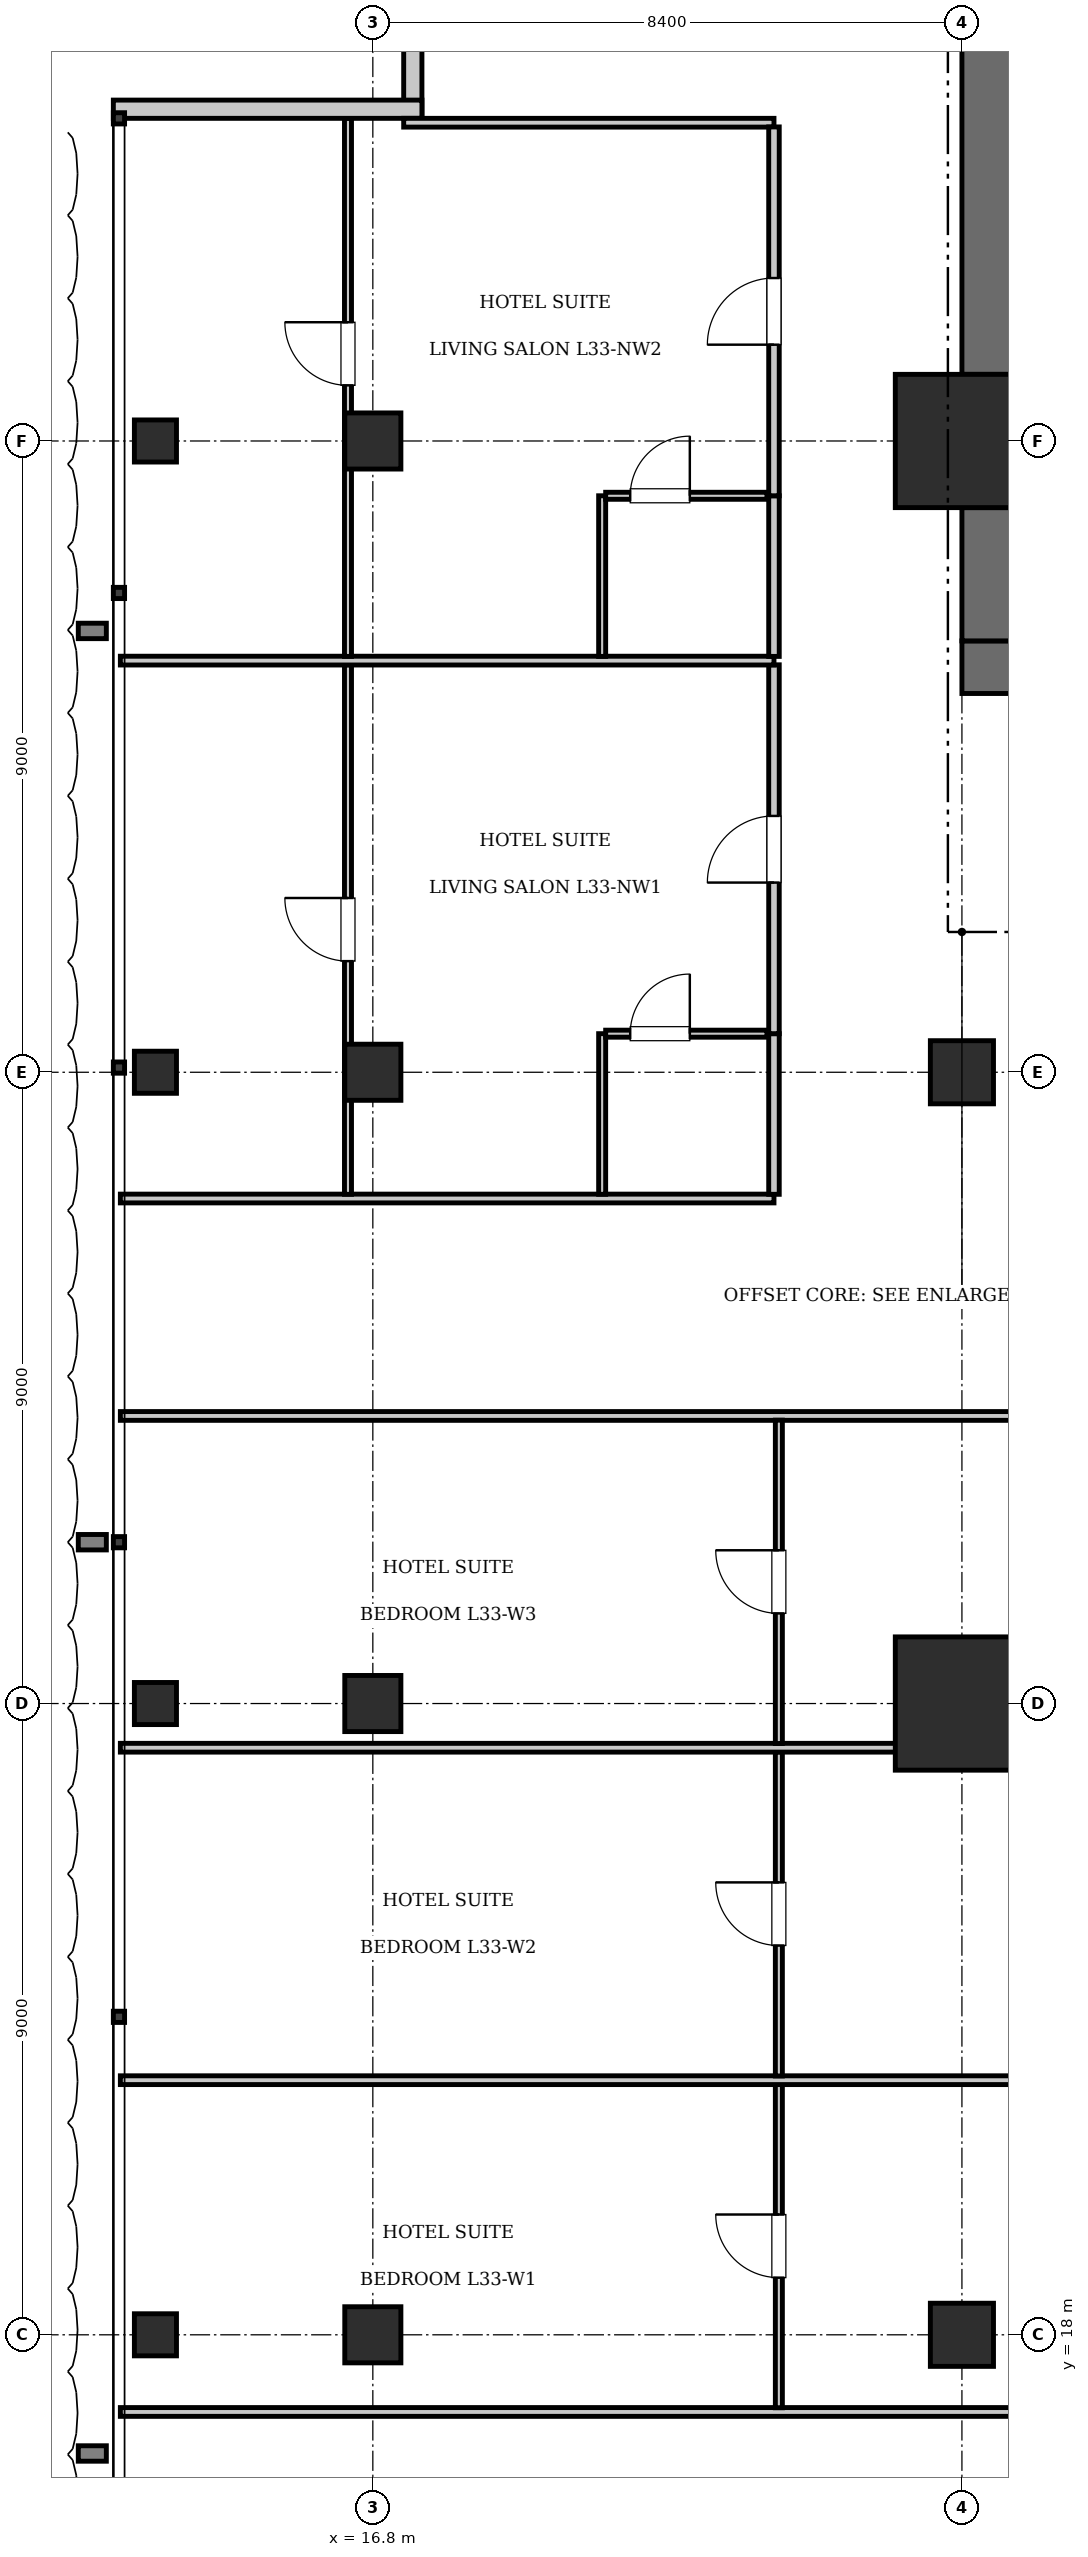
"""IFC4 building model, lengths in metres.
Left out: names, types, materials, properties, quantities, classifications, styles, units other than length and angle.
Written with IfcOpenShell. Run it as: python <this file> out.ifc"""

import sys

from ifc_helpers import new_model, si_unit, direction, frame, frame_2d, origin, origin_2d, place, context, subcontext, project, spatial, rectangle, i_section, extrude, element, fill, save


model = new_model("IFC4")
c1 = context("Model", 3, precision=1e-05, world=origin(), true_north=direction((0.0, 1.0)))
c2 = subcontext(c1, "Body", "Model", "MODEL_VIEW")
j1 = project(units=[si_unit("LENGTHUNIT", "METRE"), si_unit("PLANEANGLEUNIT", "RADIAN")], contexts=[c1])
p1 = place(None, origin())
s1 = spatial("IfcSite", under=j1, at=p1, CompositionType="ELEMENT")
p2 = place(p1, origin())
s2 = spatial("IfcBuilding", under=s1, at=p2, CompositionType="ELEMENT")
p3 = place(p2, frame((0.0, 0.0, 138.95)))
s3 = spatial("IfcBuildingStorey", under=s2, at=p3, CompositionType="ELEMENT", Elevation=138.95)
for number, where, z_axis, x_axis in (
    (1, (25.2, 27.0, 0.0), (0.0, 0.0, 1.0), (1.0, 0.0, 0.0)),
    (2, (25.2, 45.0, 0.0), (0.0, 0.0, 1.0), (1.0, 0.0, 0.0)),
):
    element("IfcColumn", number, at=place(p3, frame(where, z_axis=z_axis, x_axis=x_axis)), inside=s3, PredefinedType="COLUMN", context=c2, shape_type="SweptSolid", body=[
        extrude(rectangle(XDim=1.9, YDim=1.9, at=origin_2d()), origin(), (0.0, 0.0, 1.0), 3.85),
    ])
p4 = place(p3, frame((25.2, 41.775, 0.0), z_axis=(0.0, 0.0, 1.0), x_axis=(1.0, 0.0, 0.0)))
e3 = element("IfcWall", 3, at=p4, inside=s3, PredefinedType="SHEAR", context=c2, shape_type="SweptSolid", body=[
    extrude(rectangle(XDim=6.8, YDim=0.75, at=frame_2d((3.4, 0.0))), origin(), (0.0, 0.0, 1.0), 3.85),
])
p5 = place(p4, frame((1.65, 0.0, 0.0)))
e4 = element("IfcOpeningElement", 4, at=p5, cuts=e3, PredefinedType="OPENING", context=c2, shape_type="SweptSolid", body=[
    extrude(rectangle(XDim=1.15, YDim=2.15, at=frame_2d((0.575, 1.075))), frame((0.0, 0.385, 0.0), z_axis=(0.0, -1.0, 0.0), x_axis=(1.0, 0.0, 0.0)), (0.0, 0.0, 1.0), 0.77),
])
p6 = place(p4, frame((5.15, 0.0, 0.0)))
e5 = element("IfcOpeningElement", 5, at=p6, cuts=e3, PredefinedType="OPENING", context=c2, shape_type="SweptSolid", body=[
    extrude(rectangle(XDim=1.1, YDim=2.2, at=frame_2d((0.55, 1.1))), frame((0.0, 0.385, 0.0), z_axis=(0.0, -1.0, 0.0), x_axis=(1.0, 0.0, 0.0)), (0.0, 0.0, 1.0), 0.77),
])
p7 = place(p3, frame((25.575, 42.15, 0.0), z_axis=(0.0, 0.0, 1.0), x_axis=(0.0, 1.0, 0.0)))
e6 = element("IfcWall", 6, at=p7, inside=s3, PredefinedType="SHEAR", context=c2, shape_type="SweptSolid", body=[
    extrude(rectangle(XDim=1.9, YDim=0.75, at=frame_2d((0.95, 0.0))), origin(), (0.0, 0.0, 1.0), 3.85),
])
p8 = place(p3, frame((25.575, 45.95, 0.0), z_axis=(0.0, 0.0, 1.0), x_axis=(0.0, 1.0, 0.0)))
e7 = element("IfcWall", 7, at=p8, inside=s3, PredefinedType="SHEAR", context=c2, shape_type="SweptSolid", body=[
    extrude(rectangle(XDim=7.3, YDim=0.75, at=frame_2d((3.65, 0.0))), origin(), (0.0, 0.0, 1.0), 3.85),
])
for number, where, z_axis, x_axis in (
    (8, (25.2, 36.0, 0.0), (0.0, 0.0, 1.0), (1.0, 0.0, 0.0)),
    (9, (25.2, 18.0, 0.0), (0.0, 0.0, 1.0), (1.0, 0.0, 0.0)),
):
    element("IfcColumn", number, at=place(p3, frame(where, z_axis=z_axis, x_axis=x_axis)), inside=s3, PredefinedType="COLUMN", context=c2, shape_type="SweptSolid", body=[
        extrude(rectangle(XDim=0.9, YDim=0.9, at=origin_2d()), origin(), (0.0, 0.0, 1.0), 3.85),
    ])
for number, where, z_axis, x_axis in (
    (10, (16.8, 18.0, 0.0), (0.0, 0.0, 1.0), (1.0, 0.0, 0.0)),
    (11, (16.8, 27.0, 0.0), (0.0, 0.0, 1.0), (1.0, 0.0, 0.0)),
    (12, (16.8, 36.0, 0.0), (0.0, 0.0, 1.0), (1.0, 0.0, 0.0)),
    (13, (16.8, 45.0, 0.0), (0.0, 0.0, 1.0), (1.0, 0.0, 0.0)),
):
    element("IfcColumn", number, at=place(p3, frame(where, z_axis=z_axis, x_axis=x_axis)), inside=s3, PredefinedType="COLUMN", context=c2, shape_type="SweptSolid", body=[
        extrude(rectangle(XDim=0.8, YDim=0.8, at=origin_2d()), origin(), (0.0, 0.0, 1.0), 3.85),
    ])
for number, where, z_axis, x_axis in (
    (14, (13.7, 18.0, 0.0), (0.0, 0.0, 1.0), (1.0, 0.0, 0.0)),
    (15, (13.7, 27.0, 0.0), (0.0, 0.0, 1.0), (1.0, 0.0, 0.0)),
    (16, (13.7, 36.0, 0.0), (0.0, 0.0, 1.0), (1.0, 0.0, 0.0)),
    (17, (13.7, 45.0, 0.0), (0.0, 0.0, 1.0), (1.0, 0.0, 0.0)),
):
    element("IfcColumn", number, at=place(p3, frame(where, z_axis=z_axis, x_axis=x_axis)), inside=s3, PredefinedType="COLUMN", context=c2, shape_type="SweptSolid", body=[
        extrude(i_section(OverallWidth=0.6, OverallDepth=0.6, WebThickness=0.025, FlangeThickness=0.038, at=origin_2d()), origin(), (0.0, 0.0, 1.0), 3.85),
    ])
for number, where, z_axis, x_axis in (
    (18, (17.37, 49.6, 0.0), (0.0, 0.0, 1.0), (0.0, 1.0, 0.0)),
    (19, (13.1, 49.73, 0.0), (0.0, 0.0, 1.0), (1.0, 0.0, 0.0)),
):
    element("IfcWall", number, at=place(p3, frame(where, z_axis=z_axis, x_axis=x_axis)), inside=s3, PredefinedType="SOLIDWALL", context=c2, shape_type="SweptSolid", body=[
        extrude(rectangle(XDim=4.4, YDim=0.26, at=frame_2d((2.2, 0.0))), origin(), (0.0, 0.0, 1.0), 3.61),
    ])
for number, where, z_axis, x_axis in (
    (20, (13.2, 16.9, 0.0), (0.0, 0.0, 1.0), (1.0, 0.0, 0.0)),
    (21, (13.2, 31.1, 0.0), (0.0, 0.0, 1.0), (1.0, 0.0, 0.0)),
):
    element("IfcWall", number, at=place(p3, frame(where, z_axis=z_axis, x_axis=x_axis)), inside=s3, PredefinedType="PARTITIONING", context=c2, shape_type="SweptSolid", body=[
        extrude(rectangle(XDim=22.12, YDim=0.125, at=frame_2d((11.06, 0.0))), origin(), (0.0, 0.0, 1.0), 3.61),
    ])
p9 = place(p3, frame((22.59, 16.96, 0.0), z_axis=(0.0, 0.0, 1.0), x_axis=(0.0, 1.0, 0.0)))
e22 = element("IfcWall", 22, at=p9, inside=s3, PredefinedType="PARTITIONING", context=c2, shape_type="SweptSolid", body=[
    extrude(rectangle(XDim=4.61, YDim=0.1, at=frame_2d((2.305, 0.0))), origin(), (0.0, 0.0, 1.0), 3.61),
])
p10 = place(p9, frame((1.855, 0.0, 0.0)))
e23 = element("IfcOpeningElement", 23, at=p10, cuts=e22, PredefinedType="OPENING", context=c2, shape_type="SweptSolid", body=[
    extrude(rectangle(XDim=0.9, YDim=2.1, at=frame_2d((0.45, 1.05))), frame((0.0, 0.06, 0.0), z_axis=(0.0, -1.0, 0.0), x_axis=(1.0, 0.0, 0.0)), (0.0, 0.0, 1.0), 0.12),
])
p11 = place(p3, frame((13.2, 21.63, 0.0), z_axis=(0.0, 0.0, 1.0), x_axis=(1.0, 0.0, 0.0)))
e24 = element("IfcWall", 24, at=p11, inside=s3, PredefinedType="PARTITIONING", context=c2, shape_type="SweptSolid", body=[
    extrude(rectangle(XDim=22.12, YDim=0.125, at=frame_2d((11.06, 0.0))), origin(), (0.0, 0.0, 1.0), 3.61),
])
p12 = place(p3, frame((22.59, 21.69, 0.0), z_axis=(0.0, 0.0, 1.0), x_axis=(0.0, 1.0, 0.0)))
e25 = element("IfcWall", 25, at=p12, inside=s3, PredefinedType="PARTITIONING", context=c2, shape_type="SweptSolid", body=[
    extrude(rectangle(XDim=4.62, YDim=0.1, at=frame_2d((2.31, 0.0))), origin(), (0.0, 0.0, 1.0), 3.61),
])
p13 = place(p12, frame((1.86, 0.0, 0.0)))
e26 = element("IfcOpeningElement", 26, at=p13, cuts=e25, PredefinedType="OPENING", context=c2, shape_type="SweptSolid", body=[
    extrude(rectangle(XDim=0.9, YDim=2.1, at=frame_2d((0.45, 1.05))), frame((0.0, 0.06, 0.0), z_axis=(0.0, -1.0, 0.0), x_axis=(1.0, 0.0, 0.0)), (0.0, 0.0, 1.0), 0.12),
])
p14 = place(p3, frame((13.2, 26.37, 0.0), z_axis=(0.0, 0.0, 1.0), x_axis=(1.0, 0.0, 0.0)))
e27 = element("IfcWall", 27, at=p14, inside=s3, PredefinedType="PARTITIONING", context=c2, shape_type="SweptSolid", body=[
    extrude(rectangle(XDim=22.12, YDim=0.125, at=frame_2d((11.06, 0.0))), origin(), (0.0, 0.0, 1.0), 3.61),
])
p15 = place(p3, frame((22.59, 26.43, 0.0), z_axis=(0.0, 0.0, 1.0), x_axis=(0.0, 1.0, 0.0)))
e28 = element("IfcWall", 28, at=p15, inside=s3, PredefinedType="PARTITIONING", context=c2, shape_type="SweptSolid", body=[
    extrude(rectangle(XDim=4.61, YDim=0.1, at=frame_2d((2.305, 0.0))), origin(), (0.0, 0.0, 1.0), 3.61),
])
p16 = place(p15, frame((1.855, 0.0, 0.0)))
e29 = element("IfcOpeningElement", 29, at=p16, cuts=e28, PredefinedType="OPENING", context=c2, shape_type="SweptSolid", body=[
    extrude(rectangle(XDim=0.9, YDim=2.1, at=frame_2d((0.45, 1.05))), frame((0.0, 0.06, 0.0), z_axis=(0.0, -1.0, 0.0), x_axis=(1.0, 0.0, 0.0)), (0.0, 0.0, 1.0), 0.12),
])
p17 = place(p3, frame((13.2, 34.2, 0.0), z_axis=(0.0, 0.0, 1.0), x_axis=(1.0, 0.0, 0.0)))
e30 = element("IfcWall", 30, at=p17, inside=s3, PredefinedType="PARTITIONING", context=c2, shape_type="SweptSolid", body=[
    extrude(rectangle(XDim=9.32, YDim=0.125, at=frame_2d((4.66, 0.0))), origin(), (0.0, 0.0, 1.0), 3.61),
])
p18 = place(p3, frame((17.24, 49.538, 0.0), z_axis=(0.0, 0.0, 1.0), x_axis=(1.0, 0.0, 0.0)))
e31 = element("IfcWall", 31, at=p18, inside=s3, PredefinedType="PARTITIONING", context=c2, shape_type="SweptSolid", body=[
    extrude(rectangle(XDim=5.28, YDim=0.125, at=frame_2d((2.64, 0.0))), origin(), (0.0, 0.0, 1.0), 3.61),
])
p19 = place(p3, frame((22.52, 34.26, 0.0), z_axis=(0.0, 0.0, 1.0), x_axis=(0.0, 1.0, 0.0)))
e32 = element("IfcWall", 32, at=p19, inside=s3, PredefinedType="PARTITIONING", context=c2, shape_type="SweptSolid", body=[
    extrude(rectangle(XDim=2.29, YDim=0.15, at=frame_2d((1.145, 0.0))), origin(), (0.0, 0.0, 1.0), 3.61),
])
p20 = place(p3, frame((22.52, 36.55, 0.0), z_axis=(0.0, 0.0, 1.0), x_axis=(0.0, 1.0, 0.0)))
e33 = element("IfcWall", 33, at=p20, inside=s3, PredefinedType="PARTITIONING", context=c2, shape_type="SweptSolid", body=[
    extrude(rectangle(XDim=5.259, YDim=0.15, at=frame_2d((2.629, 0.0))), origin(), (0.0, 0.0, 1.0), 3.61),
])
p21 = place(p20, frame((2.154, 0.0, 0.0)))
e34 = element("IfcOpeningElement", 34, at=p21, cuts=e33, PredefinedType="OPENING", context=c2, shape_type="SweptSolid", body=[
    extrude(rectangle(XDim=0.95, YDim=2.15, at=frame_2d((0.475, 1.075))), frame((0.0, 0.085, 0.0), z_axis=(0.0, -1.0, 0.0), x_axis=(1.0, 0.0, 0.0)), (0.0, 0.0, 1.0), 0.17),
])
p22 = place(p3, frame((20.07, 34.26, 0.0), z_axis=(0.0, 0.0, 1.0), x_axis=(0.0, 1.0, 0.0)))
e35 = element("IfcWall", 35, at=p22, inside=s3, PredefinedType="PARTITIONING", context=c2, shape_type="SweptSolid", body=[
    extrude(rectangle(XDim=2.29, YDim=0.1, at=frame_2d((1.145, 0.0))), origin(), (0.0, 0.0, 1.0), 3.61),
])
p23 = place(p3, frame((20.12, 36.55, 0.0), z_axis=(0.0, 0.0, 1.0), x_axis=(1.0, 0.0, 0.0)))
e36 = element("IfcWall", 36, at=p23, inside=s3, PredefinedType="PARTITIONING", context=c2, shape_type="SweptSolid", body=[
    extrude(rectangle(XDim=2.3, YDim=0.1, at=frame_2d((1.15, 0.0))), origin(), (0.0, 0.0, 1.0), 3.61),
])
p24 = place(p23, frame((0.35, 0.0, 0.0)))
e37 = element("IfcOpeningElement", 37, at=p24, cuts=e36, PredefinedType="OPENING", context=c2, shape_type="SweptSolid", body=[
    extrude(rectangle(XDim=0.85, YDim=2.1, at=frame_2d((0.425, 1.05))), frame((0.0, 0.06, 0.0), z_axis=(0.0, -1.0, 0.0), x_axis=(1.0, 0.0, 0.0)), (0.0, 0.0, 1.0), 0.12),
])
p25 = place(p3, frame((16.446, 34.26, 0.0), z_axis=(0.0, 0.0, 1.0), x_axis=(0.0, 1.0, 0.0)))
e38 = element("IfcWall", 38, at=p25, inside=s3, PredefinedType="PARTITIONING", context=c2, shape_type="SweptSolid", body=[
    extrude(rectangle(XDim=7.549, YDim=0.1, at=frame_2d((3.774, 0.0))), origin(), (0.0, 0.0, 1.0), 3.61),
])
p26 = place(p25, frame((3.324, 0.0, 0.0)))
e39 = element("IfcOpeningElement", 39, at=p26, cuts=e38, PredefinedType="OPENING", context=c2, shape_type="SweptSolid", body=[
    extrude(rectangle(XDim=0.9, YDim=2.1, at=frame_2d((0.45, 1.05))), frame((0.0, 0.06, 0.0), z_axis=(0.0, -1.0, 0.0), x_axis=(1.0, 0.0, 0.0)), (0.0, 0.0, 1.0), 0.12),
])
p27 = place(p3, frame((13.2, 41.869, 0.0), z_axis=(0.0, 0.0, 1.0), x_axis=(1.0, 0.0, 0.0)))
e40 = element("IfcWall", 40, at=p27, inside=s3, PredefinedType="PARTITIONING", context=c2, shape_type="SweptSolid", body=[
    extrude(rectangle(XDim=9.32, YDim=0.125, at=frame_2d((4.66, 0.0))), origin(), (0.0, 0.0, 1.0), 3.61),
])
p28 = place(p3, frame((22.52, 41.929, 0.0), z_axis=(0.0, 0.0, 1.0), x_axis=(0.0, 1.0, 0.0)))
e41 = element("IfcWall", 41, at=p28, inside=s3, PredefinedType="PARTITIONING", context=c2, shape_type="SweptSolid", body=[
    extrude(rectangle(XDim=2.29, YDim=0.15, at=frame_2d((1.145, 0.0))), origin(), (0.0, 0.0, 1.0), 3.61),
])
p29 = place(p3, frame((22.52, 44.219, 0.0), z_axis=(0.0, 0.0, 1.0), x_axis=(0.0, 1.0, 0.0)))
e42 = element("IfcWall", 42, at=p29, inside=s3, PredefinedType="PARTITIONING", context=c2, shape_type="SweptSolid", body=[
    extrude(rectangle(XDim=5.259, YDim=0.15, at=frame_2d((2.629, 0.0))), origin(), (0.0, 0.0, 1.0), 3.61),
])
p30 = place(p29, frame((2.154, 0.0, 0.0)))
e43 = element("IfcOpeningElement", 43, at=p30, cuts=e42, PredefinedType="OPENING", context=c2, shape_type="SweptSolid", body=[
    extrude(rectangle(XDim=0.95, YDim=2.15, at=frame_2d((0.475, 1.075))), frame((0.0, 0.085, 0.0), z_axis=(0.0, -1.0, 0.0), x_axis=(1.0, 0.0, 0.0)), (0.0, 0.0, 1.0), 0.17),
])
p31 = place(p3, frame((20.07, 41.929, 0.0), z_axis=(0.0, 0.0, 1.0), x_axis=(0.0, 1.0, 0.0)))
e44 = element("IfcWall", 44, at=p31, inside=s3, PredefinedType="PARTITIONING", context=c2, shape_type="SweptSolid", body=[
    extrude(rectangle(XDim=2.29, YDim=0.1, at=frame_2d((1.145, 0.0))), origin(), (0.0, 0.0, 1.0), 3.61),
])
p32 = place(p3, frame((20.12, 44.219, 0.0), z_axis=(0.0, 0.0, 1.0), x_axis=(1.0, 0.0, 0.0)))
e45 = element("IfcWall", 45, at=p32, inside=s3, PredefinedType="PARTITIONING", context=c2, shape_type="SweptSolid", body=[
    extrude(rectangle(XDim=2.3, YDim=0.1, at=frame_2d((1.15, 0.0))), origin(), (0.0, 0.0, 1.0), 3.61),
])
p33 = place(p32, frame((0.35, 0.0, 0.0)))
e46 = element("IfcOpeningElement", 46, at=p33, cuts=e45, PredefinedType="OPENING", context=c2, shape_type="SweptSolid", body=[
    extrude(rectangle(XDim=0.85, YDim=2.1, at=frame_2d((0.425, 1.05))), frame((0.0, 0.06, 0.0), z_axis=(0.0, -1.0, 0.0), x_axis=(1.0, 0.0, 0.0)), (0.0, 0.0, 1.0), 0.12),
])
p34 = place(p3, frame((16.446, 41.929, 0.0), z_axis=(0.0, 0.0, 1.0), x_axis=(0.0, 1.0, 0.0)))
e47 = element("IfcWall", 47, at=p34, inside=s3, PredefinedType="PARTITIONING", context=c2, shape_type="SweptSolid", body=[
    extrude(rectangle(XDim=7.669, YDim=0.1, at=frame_2d((3.834, 0.0))), origin(), (0.0, 0.0, 1.0), 3.61),
])
p35 = place(p34, frame((3.864, 0.0, 0.0)))
e48 = element("IfcOpeningElement", 48, at=p35, cuts=e47, PredefinedType="OPENING", context=c2, shape_type="SweptSolid", body=[
    extrude(rectangle(XDim=0.9, YDim=2.1, at=frame_2d((0.45, 1.05))), frame((0.0, 0.06, 0.0), z_axis=(0.0, -1.0, 0.0), x_axis=(1.0, 0.0, 0.0)), (0.0, 0.0, 1.0), 0.12),
])
p36 = place(p10, origin())
e49 = element("IfcDoor", 49, at=p36, inside=s3, OperationType="SINGLE_SWING_RIGHT", PredefinedType="DOOR", context=c2, shape_type="SweptSolid", body=[
    extrude(rectangle(XDim=0.9, YDim=2.1, at=frame_2d((0.45, 1.05))), frame((0.0, 0.025, 0.0), z_axis=(0.0, -1.0, 0.0), x_axis=(1.0, 0.0, 0.0)), (0.0, 0.0, 1.0), 0.05),
])
fill(e23, e49)
p37 = place(p13, origin())
e50 = element("IfcDoor", 50, at=p37, inside=s3, OperationType="SINGLE_SWING_RIGHT", PredefinedType="DOOR", context=c2, shape_type="SweptSolid", body=[
    extrude(rectangle(XDim=0.9, YDim=2.1, at=frame_2d((0.45, 1.05))), frame((0.0, 0.025, 0.0), z_axis=(0.0, -1.0, 0.0), x_axis=(1.0, 0.0, 0.0)), (0.0, 0.0, 1.0), 0.05),
])
fill(e26, e50)
p38 = place(p16, origin())
e51 = element("IfcDoor", 51, at=p38, inside=s3, OperationType="SINGLE_SWING_RIGHT", PredefinedType="DOOR", context=c2, shape_type="SweptSolid", body=[
    extrude(rectangle(XDim=0.9, YDim=2.1, at=frame_2d((0.45, 1.05))), frame((0.0, 0.025, 0.0), z_axis=(0.0, -1.0, 0.0), x_axis=(1.0, 0.0, 0.0)), (0.0, 0.0, 1.0), 0.05),
])
fill(e29, e51)
p39 = place(p24, origin())
e52 = element("IfcDoor", 52, at=p39, inside=s3, OperationType="SINGLE_SWING_RIGHT", PredefinedType="DOOR", context=c2, shape_type="SweptSolid", body=[
    extrude(rectangle(XDim=0.85, YDim=2.1, at=frame_2d((0.425, 1.05))), frame((0.0, 0.025, 0.0), z_axis=(0.0, -1.0, 0.0), x_axis=(1.0, 0.0, 0.0)), (0.0, 0.0, 1.0), 0.05),
])
fill(e37, e52)
p40 = place(p21, origin())
e53 = element("IfcDoor", 53, at=p40, inside=s3, OperationType="SINGLE_SWING_LEFT", PredefinedType="DOOR", context=c2, shape_type="SweptSolid", body=[
    extrude(rectangle(XDim=0.95, YDim=2.15, at=frame_2d((0.475, 1.075))), frame((0.0, 0.025, 0.0), z_axis=(0.0, -1.0, 0.0), x_axis=(1.0, 0.0, 0.0)), (0.0, 0.0, 1.0), 0.05),
])
fill(e34, e53)
p41 = place(p26, origin())
e54 = element("IfcDoor", 54, at=p41, inside=s3, OperationType="SINGLE_SWING_RIGHT", PredefinedType="DOOR", context=c2, shape_type="SweptSolid", body=[
    extrude(rectangle(XDim=0.9, YDim=2.1, at=frame_2d((0.45, 1.05))), frame((0.0, 0.025, 0.0), z_axis=(0.0, -1.0, 0.0), x_axis=(1.0, 0.0, 0.0)), (0.0, 0.0, 1.0), 0.05),
])
fill(e39, e54)
p42 = place(p33, origin())
e55 = element("IfcDoor", 55, at=p42, inside=s3, OperationType="SINGLE_SWING_RIGHT", PredefinedType="DOOR", context=c2, shape_type="SweptSolid", body=[
    extrude(rectangle(XDim=0.85, YDim=2.1, at=frame_2d((0.425, 1.05))), frame((0.0, 0.025, 0.0), z_axis=(0.0, -1.0, 0.0), x_axis=(1.0, 0.0, 0.0)), (0.0, 0.0, 1.0), 0.05),
])
fill(e46, e55)
p43 = place(p30, origin())
e56 = element("IfcDoor", 56, at=p43, inside=s3, OperationType="SINGLE_SWING_LEFT", PredefinedType="DOOR", context=c2, shape_type="SweptSolid", body=[
    extrude(rectangle(XDim=0.95, YDim=2.15, at=frame_2d((0.475, 1.075))), frame((0.0, 0.025, 0.0), z_axis=(0.0, -1.0, 0.0), x_axis=(1.0, 0.0, 0.0)), (0.0, 0.0, 1.0), 0.05),
])
fill(e43, e56)
p44 = place(p35, origin())
e57 = element("IfcDoor", 57, at=p44, inside=s3, OperationType="SINGLE_SWING_RIGHT", PredefinedType="DOOR", context=c2, shape_type="SweptSolid", body=[
    extrude(rectangle(XDim=0.9, YDim=2.1, at=frame_2d((0.45, 1.05))), frame((0.0, 0.025, 0.0), z_axis=(0.0, -1.0, 0.0), x_axis=(1.0, 0.0, 0.0)), (0.0, 0.0, 1.0), 0.05),
])
fill(e48, e57)
save(model, sys.argv[1])
